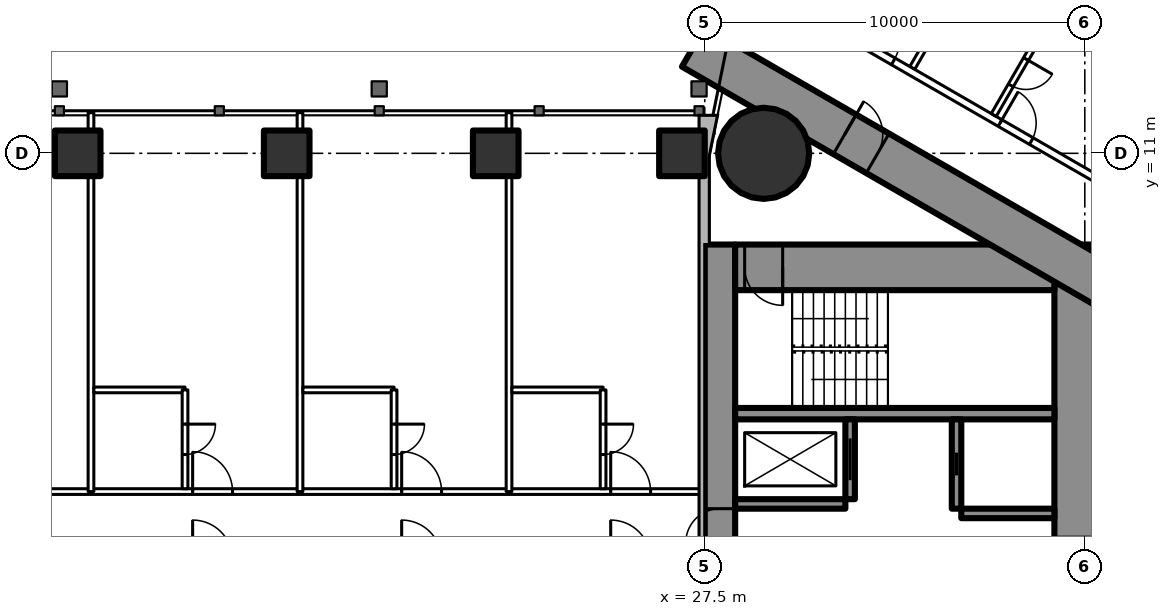
"""IFC4 building model, lengths in metres.
Left out: names, types, materials, properties, quantities, classifications, styles, units other than length and angle.
Written with IfcOpenShell. Run it as: python <this file> out.ifc"""

import sys

from ifc_helpers import new_model, si_unit, direction, frame, frame_2d, origin, origin_2d, place, context, subcontext, project, spatial, rectangle, hollow_rectangle, circle, extrude, element, fill, save


model = new_model("IFC4")
c1 = context("Model", 3, precision=1e-05, world=origin(), true_north=direction((0.0, 1.0)))
c2 = subcontext(c1, "Body", "Model", "MODEL_VIEW")
j1 = project(units=[si_unit("LENGTHUNIT", "METRE"), si_unit("PLANEANGLEUNIT", "RADIAN")], contexts=[c1])
p1 = place(None, origin())
s1 = spatial("IfcSite", under=j1, at=p1, CompositionType="ELEMENT")
p2 = place(p1, origin())
s2 = spatial("IfcBuilding", under=s1, at=p2, CompositionType="ELEMENT")
p3 = place(p2, frame((0.0, 0.0, 215.3)))
s3 = spatial("IfcBuildingStorey", under=s2, at=p3, CompositionType="ELEMENT", Elevation=215.3)
p4 = place(p3, frame((29.05, 11.0, 0.0), z_axis=(0.0, 0.0, 1.0), x_axis=(1.0, 0.0, 0.0)))
e1 = element("IfcColumn", 1, at=p4, inside=s3, PredefinedType="COLUMN", context=c2, shape_type="SweptSolid", body=[
    extrude(circle(Radius=1.2, at=origin_2d()), origin(), (0.0, 0.0, 1.0), 3.6),
])
p5 = place(p3, frame((27.9, -8.6, 0.0), z_axis=(0.0, 0.0, 1.0), x_axis=(0.0, 1.0, 0.0)))
e2 = element("IfcWall", 2, at=p5, inside=s3, PredefinedType="SHEAR", context=c2, shape_type="SweptSolid", body=[
    extrude(rectangle(XDim=17.2, YDim=0.8, at=frame_2d((8.6, 0.0))), origin(), (0.0, 0.0, 1.0), 3.6),
])
p6 = place(p5, frame((9.35, 0.0, 0.0)))
e3 = element("IfcOpeningElement", 3, at=p6, cuts=e2, PredefinedType="OPENING", context=c2, shape_type="SweptSolid", body=[
    extrude(rectangle(XDim=0.9, YDim=2.2, at=frame_2d((0.45, 1.1))), frame((0.0, 0.41, 0.0), z_axis=(0.0, -1.0, 0.0), x_axis=(1.0, 0.0, 0.0)), (0.0, 0.0, 1.0), 0.82),
])
p7 = place(p3, frame((37.3, -8.6, 0.0), z_axis=(0.0, 0.0, 1.0), x_axis=(0.0, 1.0, 0.0)))
e4 = element("IfcWall", 4, at=p7, inside=s3, PredefinedType="SHEAR", context=c2, shape_type="SweptSolid", body=[
    extrude(rectangle(XDim=17.2, YDim=1.2, at=frame_2d((8.6, 0.0))), origin(), (0.0, 0.0, 1.0), 3.6),
])
p8 = place(p7, frame((7.7, 0.0, 0.0)))
e5 = element("IfcOpeningElement", 5, at=p8, cuts=e4, PredefinedType="OPENING", context=c2, shape_type="SweptSolid", body=[
    extrude(rectangle(XDim=1.8, YDim=2.2, at=frame_2d((0.9, 1.1))), frame((0.0, 0.61, 0.0), z_axis=(0.0, -1.0, 0.0), x_axis=(1.0, 0.0, 0.0)), (0.0, 0.0, 1.0), 1.22),
])
p9 = place(p3, frame((28.3, 8.0, 0.0), z_axis=(0.0, 0.0, 1.0), x_axis=(1.0, 0.0, 0.0)))
e6 = element("IfcWall", 6, at=p9, inside=s3, PredefinedType="SHEAR", context=c2, shape_type="SweptSolid", body=[
    extrude(rectangle(XDim=8.4, YDim=1.2, at=frame_2d((4.2, 0.0))), origin(), (0.0, 0.0, 1.0), 3.6),
])
p10 = place(p9, frame((0.25, 0.0, 0.0)))
e7 = element("IfcOpeningElement", 7, at=p10, cuts=e6, PredefinedType="OPENING", context=c2, shape_type="SweptSolid", body=[
    extrude(rectangle(XDim=1.0, YDim=2.2, at=frame_2d((0.5, 1.1))), frame((0.0, 0.61, 0.0), z_axis=(0.0, -1.0, 0.0), x_axis=(1.0, 0.0, 0.0)), (0.0, 0.0, 1.0), 1.22),
])
p11 = place(p3, frame((28.3, 4.15, 0.0), z_axis=(0.0, 0.0, 1.0), x_axis=(1.0, 0.0, 0.0)))
e8 = element("IfcWall", 8, at=p11, inside=s3, PredefinedType="SHEAR", context=c2, shape_type="SweptSolid", body=[
    extrude(rectangle(XDim=8.4, YDim=0.3, at=frame_2d((4.2, 0.0))), origin(), (0.0, 0.0, 1.0), 3.6),
])
p12 = place(p3, frame((31.325, 1.9, 0.0), z_axis=(0.0, 0.0, 1.0), x_axis=(0.0, 1.0, 0.0)))
e9 = element("IfcWall", 9, at=p12, inside=s3, PredefinedType="SHEAR", context=c2, shape_type="SweptSolid", body=[
    extrude(rectangle(XDim=2.1, YDim=0.25, at=frame_2d((1.05, 0.0))), origin(), (0.0, 0.0, 1.0), 3.6),
])
p13 = place(p12, frame((0.5, 0.0, 0.0)))
e10 = element("IfcOpeningElement", 10, at=p13, cuts=e9, PredefinedType="OPENING", context=c2, shape_type="SweptSolid", body=[
    extrude(rectangle(XDim=1.1, YDim=2.2, at=frame_2d((0.55, 1.1))), frame((0.0, 0.135, 0.0), z_axis=(0.0, -1.0, 0.0), x_axis=(1.0, 0.0, 0.0)), (0.0, 0.0, 1.0), 0.27),
])
p14 = place(p3, frame((34.125, 1.65, 0.0), z_axis=(0.0, 0.0, 1.0), x_axis=(0.0, 1.0, 0.0)))
e11 = element("IfcWall", 11, at=p14, inside=s3, PredefinedType="SHEAR", context=c2, shape_type="SweptSolid", body=[
    extrude(rectangle(XDim=2.35, YDim=0.25, at=frame_2d((1.175, 0.0))), origin(), (0.0, 0.0, 1.0), 3.6),
])
p15 = place(p14, frame((0.875, 0.0, 0.0)))
e12 = element("IfcOpeningElement", 12, at=p15, cuts=e11, PredefinedType="OPENING", context=c2, shape_type="SweptSolid", body=[
    extrude(rectangle(XDim=0.6, YDim=2.0, at=frame_2d((0.3, 1.0))), frame((0.0, 0.135, 0.0), z_axis=(0.0, -1.0, 0.0), x_axis=(1.0, 0.0, 0.0)), (0.0, 0.0, 1.0), 0.27),
])
p16 = place(p3, frame((28.3, 1.775, 0.0), z_axis=(0.0, 0.0, 1.0), x_axis=(1.0, 0.0, 0.0)))
e13 = element("IfcWall", 13, at=p16, inside=s3, PredefinedType="SHEAR", context=c2, shape_type="SweptSolid", body=[
    extrude(rectangle(XDim=2.9, YDim=0.25, at=frame_2d((1.45, 0.0))), origin(), (0.0, 0.0, 1.0), 3.6),
])
p17 = place(p3, frame((34.25, 1.525, 0.0), z_axis=(0.0, 0.0, 1.0), x_axis=(1.0, 0.0, 0.0)))
e14 = element("IfcWall", 14, at=p17, inside=s3, PredefinedType="SHEAR", context=c2, shape_type="SweptSolid", body=[
    extrude(rectangle(XDim=2.45, YDim=0.25, at=frame_2d((1.225, 0.0))), origin(), (0.0, 0.0, 1.0), 3.6),
])
p18 = place(p3, frame((27.2, 13.8, 0.0), z_axis=(0.0, 0.0, 1.0), x_axis=(0.866024515034, -0.500001539357, 0.0)))
e15 = element("IfcWall", 15, at=p18, inside=s3, PredefinedType="SHEAR", context=c2, shape_type="SweptSolid", body=[
    extrude(rectangle(XDim=26.907, YDim=1.2, at=frame_2d((13.454, 0.0))), origin(), (0.0, 0.0, 1.0), 3.6),
])
p19 = place(p18, frame((4.6, 0.0, 0.0)))
e16 = element("IfcOpeningElement", 16, at=p19, cuts=e15, PredefinedType="OPENING", context=c2, shape_type="SweptSolid", body=[
    extrude(rectangle(XDim=1.0, YDim=2.2, at=frame_2d((0.5, 1.1))), frame((0.0, 0.61, 0.0), z_axis=(0.0, -1.0, 0.0), x_axis=(1.0, 0.0, 0.0)), (0.0, 0.0, 1.0), 1.22),
])
p20 = place(p18, frame((13.395, 0.0, 0.0)))
e17 = element("IfcOpeningElement", 17, at=p20, cuts=e15, PredefinedType="OPENING", context=c2, shape_type="SweptSolid", body=[
    extrude(rectangle(XDim=1.8, YDim=2.2, at=frame_2d((0.9, 1.1))), frame((0.0, 0.61, 0.0), z_axis=(0.0, -1.0, 0.0), x_axis=(1.0, 0.0, 0.0)), (0.0, 0.0, 1.0), 1.22),
])
for number, where, z_axis, x_axis in (
    (18, (11.0, 11.0, 0.0), (0.0, 0.0, 1.0), (1.0, 0.0, 0.0)),
    (19, (16.5, 11.0, 0.0), (0.0, 0.0, 1.0), (1.0, 0.0, 0.0)),
    (20, (22.0, 11.0, 0.0), (0.0, 0.0, 1.0), (1.0, 0.0, 0.0)),
    (21, (26.9, 11.0, 0.0), (0.0, 0.0, 1.0), (1.0, 0.0, 0.0)),
):
    element("IfcColumn", number, at=place(p3, frame(where, z_axis=z_axis, x_axis=x_axis)), inside=s3, PredefinedType="COLUMN", context=c2, shape_type="SweptSolid", body=[
        extrude(hollow_rectangle(XDim=1.2, YDim=1.2, WallThickness=0.12, at=origin_2d()), origin(), (0.0, 0.0, 1.0), 3.6),
    ])
p21 = place(p3, frame((32.96, 13.246, 0.0), z_axis=(0.0, 0.0, 1.0), x_axis=(0.500000236886, 0.866025267018, 0.0)))
e22 = element("IfcWall", 22, at=p21, inside=s3, PredefinedType="PARTITIONING", context=c2, shape_type="SweptSolid", body=[
    extrude(rectangle(XDim=7.583, YDim=0.15, at=frame_2d((3.791, 0.0))), origin(), (0.0, 0.0, 1.0), 3.35),
])
p22 = place(p3, frame((28.959, 15.44, 0.0), z_axis=(0.0, 0.0, 1.0), x_axis=(0.866028936079, -0.499993881836, 0.0)))
e23 = element("IfcWall", 23, at=p22, inside=s3, PredefinedType="PARTITIONING", context=c2, shape_type="SweptSolid", body=[
    extrude(rectangle(XDim=20.503, YDim=0.2, at=frame_2d((10.251, 0.0))), origin(), (0.0, 0.0, 1.0), 3.35),
])
p23 = place(p22, frame((16.603, 0.0, 0.0)))
e24 = element("IfcOpeningElement", 24, at=p23, cuts=e23, PredefinedType="OPENING", context=c2, shape_type="SweptSolid", body=[
    extrude(rectangle(XDim=0.95, YDim=2.2, at=frame_2d((0.475, 1.1))), frame((0.0, 0.11, 0.0), z_axis=(0.0, -1.0, 0.0), x_axis=(1.0, 0.0, 0.0)), (0.0, 0.0, 1.0), 0.22),
])
p24 = place(p22, frame((7.287, 0.0, 0.0)))
e25 = element("IfcOpeningElement", 25, at=p24, cuts=e23, PredefinedType="OPENING", context=c2, shape_type="SweptSolid", body=[
    extrude(rectangle(XDim=0.95, YDim=2.2, at=frame_2d((0.475, 1.1))), frame((0.0, 0.11, 0.0), z_axis=(0.0, -1.0, 0.0), x_axis=(1.0, 0.0, 0.0)), (0.0, 0.0, 1.0), 0.22),
])
p25 = place(p22, frame((2.244, 0.0, 0.0)))
e26 = element("IfcOpeningElement", 26, at=p25, cuts=e23, PredefinedType="OPENING", context=c2, shape_type="SweptSolid", body=[
    extrude(rectangle(XDim=1.8, YDim=2.2, at=frame_2d((0.9, 1.1))), frame((0.0, 0.11, 0.0), z_axis=(0.0, -1.0, 0.0), x_axis=(1.0, 0.0, 0.0)), (0.0, 0.0, 1.0), 0.22),
])
p26 = place(p3, frame((35.104, 12.008, 0.0), z_axis=(0.0, 0.0, 1.0), x_axis=(0.500047596559, 0.865997922154, 0.0)))
e27 = element("IfcWall", 27, at=p26, inside=s3, PredefinedType="PARTITIONING", context=c2, shape_type="SweptSolid", body=[
    extrude(rectangle(XDim=2.6, YDim=0.15, at=frame_2d((1.3, 0.0))), origin(), (0.0, 0.0, 1.0), 3.35),
])
p27 = place(p26, frame((0.9, 0.0, 0.0)))
e28 = element("IfcOpeningElement", 28, at=p27, cuts=e27, PredefinedType="OPENING", context=c2, shape_type="SweptSolid", body=[
    extrude(rectangle(XDim=0.8, YDim=2.2, at=frame_2d((0.4, 1.1))), frame((0.0, 0.085, 0.0), z_axis=(0.0, -1.0, 0.0), x_axis=(1.0, 0.0, 0.0)), (0.0, 0.0, 1.0), 0.17),
])
p28 = place(p3, frame((-27.5, 2.1, 0.0), z_axis=(0.0, 0.0, 1.0), x_axis=(1.0, 0.0, 0.0)))
e29 = element("IfcWall", 29, at=p28, inside=s3, PredefinedType="PARTITIONING", context=c2, shape_type="SweptSolid", body=[
    extrude(rectangle(XDim=55.0, YDim=0.15, at=frame_2d((27.5, 0.0))), origin(), (0.0, 0.0, 1.0), 3.4),
])
p29 = place(p28, frame((2.025, 0.0, 0.0)))
e30 = element("IfcOpeningElement", 30, at=p29, cuts=e29, PredefinedType="OPENING", context=c2, shape_type="SweptSolid", body=[
    extrude(rectangle(XDim=1.05, YDim=2.4, at=frame_2d((0.525, 1.2))), frame((0.0, 0.085, 0.0), z_axis=(0.0, -1.0, 0.0), x_axis=(1.0, 0.0, 0.0)), (0.0, 0.0, 1.0), 0.17),
])
p30 = place(p28, frame((8.525, 0.0, 0.0)))
e31 = element("IfcOpeningElement", 31, at=p30, cuts=e29, PredefinedType="OPENING", context=c2, shape_type="SweptSolid", body=[
    extrude(rectangle(XDim=1.05, YDim=2.4, at=frame_2d((0.525, 1.2))), frame((0.0, 0.085, 0.0), z_axis=(0.0, -1.0, 0.0), x_axis=(1.0, 0.0, 0.0)), (0.0, 0.0, 1.0), 0.17),
])
p31 = place(p28, frame((14.025, 0.0, 0.0)))
e32 = element("IfcOpeningElement", 32, at=p31, cuts=e29, PredefinedType="OPENING", context=c2, shape_type="SweptSolid", body=[
    extrude(rectangle(XDim=1.05, YDim=2.4, at=frame_2d((0.525, 1.2))), frame((0.0, 0.085, 0.0), z_axis=(0.0, -1.0, 0.0), x_axis=(1.0, 0.0, 0.0)), (0.0, 0.0, 1.0), 0.17),
])
p32 = place(p28, frame((19.525, 0.0, 0.0)))
e33 = element("IfcOpeningElement", 33, at=p32, cuts=e29, PredefinedType="OPENING", context=c2, shape_type="SweptSolid", body=[
    extrude(rectangle(XDim=1.05, YDim=2.4, at=frame_2d((0.525, 1.2))), frame((0.0, 0.085, 0.0), z_axis=(0.0, -1.0, 0.0), x_axis=(1.0, 0.0, 0.0)), (0.0, 0.0, 1.0), 0.17),
])
p33 = place(p28, frame((25.025, 0.0, 0.0)))
e34 = element("IfcOpeningElement", 34, at=p33, cuts=e29, PredefinedType="OPENING", context=c2, shape_type="SweptSolid", body=[
    extrude(rectangle(XDim=1.05, YDim=2.4, at=frame_2d((0.525, 1.2))), frame((0.0, 0.085, 0.0), z_axis=(0.0, -1.0, 0.0), x_axis=(1.0, 0.0, 0.0)), (0.0, 0.0, 1.0), 0.17),
])
p34 = place(p28, frame((30.525, 0.0, 0.0)))
e35 = element("IfcOpeningElement", 35, at=p34, cuts=e29, PredefinedType="OPENING", context=c2, shape_type="SweptSolid", body=[
    extrude(rectangle(XDim=1.05, YDim=2.4, at=frame_2d((0.525, 1.2))), frame((0.0, 0.085, 0.0), z_axis=(0.0, -1.0, 0.0), x_axis=(1.0, 0.0, 0.0)), (0.0, 0.0, 1.0), 0.17),
])
p35 = place(p28, frame((36.025, 0.0, 0.0)))
e36 = element("IfcOpeningElement", 36, at=p35, cuts=e29, PredefinedType="OPENING", context=c2, shape_type="SweptSolid", body=[
    extrude(rectangle(XDim=1.05, YDim=2.4, at=frame_2d((0.525, 1.2))), frame((0.0, 0.085, 0.0), z_axis=(0.0, -1.0, 0.0), x_axis=(1.0, 0.0, 0.0)), (0.0, 0.0, 1.0), 0.17),
])
p36 = place(p28, frame((41.525, 0.0, 0.0)))
e37 = element("IfcOpeningElement", 37, at=p36, cuts=e29, PredefinedType="OPENING", context=c2, shape_type="SweptSolid", body=[
    extrude(rectangle(XDim=1.05, YDim=2.4, at=frame_2d((0.525, 1.2))), frame((0.0, 0.085, 0.0), z_axis=(0.0, -1.0, 0.0), x_axis=(1.0, 0.0, 0.0)), (0.0, 0.0, 1.0), 0.17),
])
p37 = place(p28, frame((47.025, 0.0, 0.0)))
e38 = element("IfcOpeningElement", 38, at=p37, cuts=e29, PredefinedType="OPENING", context=c2, shape_type="SweptSolid", body=[
    extrude(rectangle(XDim=1.05, YDim=2.4, at=frame_2d((0.525, 1.2))), frame((0.0, 0.085, 0.0), z_axis=(0.0, -1.0, 0.0), x_axis=(1.0, 0.0, 0.0)), (0.0, 0.0, 1.0), 0.17),
])
p38 = place(p28, frame((52.525, 0.0, 0.0)))
e39 = element("IfcOpeningElement", 39, at=p38, cuts=e29, PredefinedType="OPENING", context=c2, shape_type="SweptSolid", body=[
    extrude(rectangle(XDim=1.05, YDim=2.4, at=frame_2d((0.525, 1.2))), frame((0.0, 0.085, 0.0), z_axis=(0.0, -1.0, 0.0), x_axis=(1.0, 0.0, 0.0)), (0.0, 0.0, 1.0), 0.17),
])
for number, where, z_axis, x_axis in (
    (40, (11.35, 2.1, 0.0), (0.0, 0.0, 1.0), (0.0, 1.0, 0.0)),
    (41, (16.85, 2.1, 0.0), (0.0, 0.0, 1.0), (0.0, 1.0, 0.0)),
    (42, (22.35, 2.1, 0.0), (0.0, 0.0, 1.0), (0.0, 1.0, 0.0)),
):
    element("IfcWall", number, at=place(p3, frame(where, z_axis=z_axis, x_axis=x_axis)), inside=s3, PredefinedType="PARTITIONING", context=c2, shape_type="SweptSolid", body=[
        extrude(rectangle(XDim=9.97, YDim=0.15, at=frame_2d((4.985, 0.0))), origin(), (0.0, 0.0, 1.0), 3.4),
    ])
p39 = place(p3, frame((11.425, 4.775, 0.0), z_axis=(0.0, 0.0, 1.0), x_axis=(1.0, 0.0, 0.0)))
e43 = element("IfcWall", 43, at=p39, inside=s3, PredefinedType="PARTITIONING", context=c2, shape_type="SweptSolid", body=[
    extrude(rectangle(XDim=2.4, YDim=0.15, at=frame_2d((1.2, 0.0))), origin(), (0.0, 0.0, 1.0), 3.4),
])
p40 = place(p3, frame((13.825, 2.175, 0.0), z_axis=(0.0, 0.0, 1.0), x_axis=(0.0, 1.0, 0.0)))
e44 = element("IfcWall", 44, at=p40, inside=s3, PredefinedType="PARTITIONING", context=c2, shape_type="SweptSolid", body=[
    extrude(rectangle(XDim=2.6, YDim=0.15, at=frame_2d((1.3, 0.0))), origin(), (0.0, 0.0, 1.0), 3.4),
])
p41 = place(p40, frame((0.9, 0.0, 0.0)))
e45 = element("IfcOpeningElement", 45, at=p41, cuts=e44, PredefinedType="OPENING", context=c2, shape_type="SweptSolid", body=[
    extrude(rectangle(XDim=0.8, YDim=2.2, at=frame_2d((0.4, 1.1))), frame((0.0, 0.085, 0.0), z_axis=(0.0, -1.0, 0.0), x_axis=(1.0, 0.0, 0.0)), (0.0, 0.0, 1.0), 0.17),
])
p42 = place(p3, frame((16.925, 4.775, 0.0), z_axis=(0.0, 0.0, 1.0), x_axis=(1.0, 0.0, 0.0)))
e46 = element("IfcWall", 46, at=p42, inside=s3, PredefinedType="PARTITIONING", context=c2, shape_type="SweptSolid", body=[
    extrude(rectangle(XDim=2.4, YDim=0.15, at=frame_2d((1.2, 0.0))), origin(), (0.0, 0.0, 1.0), 3.4),
])
p43 = place(p3, frame((19.325, 2.175, 0.0), z_axis=(0.0, 0.0, 1.0), x_axis=(0.0, 1.0, 0.0)))
e47 = element("IfcWall", 47, at=p43, inside=s3, PredefinedType="PARTITIONING", context=c2, shape_type="SweptSolid", body=[
    extrude(rectangle(XDim=2.6, YDim=0.15, at=frame_2d((1.3, 0.0))), origin(), (0.0, 0.0, 1.0), 3.4),
])
p44 = place(p43, frame((0.9, 0.0, 0.0)))
e48 = element("IfcOpeningElement", 48, at=p44, cuts=e47, PredefinedType="OPENING", context=c2, shape_type="SweptSolid", body=[
    extrude(rectangle(XDim=0.8, YDim=2.2, at=frame_2d((0.4, 1.1))), frame((0.0, 0.085, 0.0), z_axis=(0.0, -1.0, 0.0), x_axis=(1.0, 0.0, 0.0)), (0.0, 0.0, 1.0), 0.17),
])
p45 = place(p3, frame((22.425, 4.775, 0.0), z_axis=(0.0, 0.0, 1.0), x_axis=(1.0, 0.0, 0.0)))
e49 = element("IfcWall", 49, at=p45, inside=s3, PredefinedType="PARTITIONING", context=c2, shape_type="SweptSolid", body=[
    extrude(rectangle(XDim=2.4, YDim=0.15, at=frame_2d((1.2, 0.0))), origin(), (0.0, 0.0, 1.0), 3.4),
])
p46 = place(p3, frame((24.825, 2.175, 0.0), z_axis=(0.0, 0.0, 1.0), x_axis=(0.0, 1.0, 0.0)))
e50 = element("IfcWall", 50, at=p46, inside=s3, PredefinedType="PARTITIONING", context=c2, shape_type="SweptSolid", body=[
    extrude(rectangle(XDim=2.6, YDim=0.15, at=frame_2d((1.3, 0.0))), origin(), (0.0, 0.0, 1.0), 3.4),
])
p47 = place(p46, frame((0.9, 0.0, 0.0)))
e51 = element("IfcOpeningElement", 51, at=p47, cuts=e50, PredefinedType="OPENING", context=c2, shape_type="SweptSolid", body=[
    extrude(rectangle(XDim=0.8, YDim=2.2, at=frame_2d((0.4, 1.1))), frame((0.0, 0.085, 0.0), z_axis=(0.0, -1.0, 0.0), x_axis=(1.0, 0.0, 0.0)), (0.0, 0.0, 1.0), 0.17),
])
p48 = place(p27, origin())
e52 = element("IfcDoor", 52, at=p48, inside=s3, OperationType="SINGLE_SWING_RIGHT", PredefinedType="DOOR", context=c2, shape_type="SweptSolid", body=[
    extrude(rectangle(XDim=0.8, YDim=2.2, at=frame_2d((0.4, 1.1))), frame((0.0, 0.025, 0.0), z_axis=(0.0, -1.0, 0.0), x_axis=(1.0, 0.0, 0.0)), (0.0, 0.0, 1.0), 0.05),
])
fill(e28, e52)
p49 = place(p24, origin())
e53 = element("IfcDoor", 53, at=p49, inside=s3, OperationType="SINGLE_SWING_LEFT", PredefinedType="DOOR", context=c2, shape_type="SweptSolid", body=[
    extrude(rectangle(XDim=0.95, YDim=2.2, at=frame_2d((0.475, 1.1))), frame((0.0, 0.025, 0.0), z_axis=(0.0, -1.0, 0.0), x_axis=(1.0, 0.0, 0.0)), (0.0, 0.0, 1.0), 0.05),
])
fill(e25, e53)
p50 = place(p25, origin())
e54 = element("IfcDoor", 54, at=p50, inside=s3, OperationType="DOUBLE_DOOR_SINGLE_SWING", PredefinedType="DOOR", context=c2, shape_type="SweptSolid", body=[
    extrude(rectangle(XDim=1.8, YDim=2.2, at=frame_2d((0.9, 1.1))), frame((0.0, 0.025, 0.0), z_axis=(0.0, -1.0, 0.0), x_axis=(1.0, 0.0, 0.0)), (0.0, 0.0, 1.0), 0.05),
])
fill(e26, e54)
p51 = place(p19, origin())
e55 = element("IfcDoor", 55, at=p51, inside=s3, OperationType="SINGLE_SWING_LEFT", PredefinedType="DOOR", context=c2, shape_type="SweptSolid", body=[
    extrude(rectangle(XDim=1.0, YDim=2.2, at=frame_2d((0.5, 1.1))), frame((0.0, 0.025, 0.0), z_axis=(0.0, -1.0, 0.0), x_axis=(1.0, 0.0, 0.0)), (0.0, 0.0, 1.0), 0.05),
])
fill(e16, e55)
p52 = place(p10, origin())
e56 = element("IfcDoor", 56, at=p52, inside=s3, OperationType="SINGLE_SWING_RIGHT", PredefinedType="DOOR", context=c2, shape_type="SweptSolid", body=[
    extrude(rectangle(XDim=1.0, YDim=2.2, at=frame_2d((0.5, 1.1))), frame((0.0, 0.025, 0.0), z_axis=(0.0, -1.0, 0.0), x_axis=(1.0, 0.0, 0.0)), (0.0, 0.0, 1.0), 0.05),
])
fill(e7, e56)
p53 = place(p6, origin())
e57 = element("IfcDoor", 57, at=p53, inside=s3, OperationType="SINGLE_SWING_LEFT", PredefinedType="DOOR", context=c2, shape_type="SweptSolid", body=[
    extrude(rectangle(XDim=0.9, YDim=2.2, at=frame_2d((0.45, 1.1))), frame((0.0, 0.025, 0.0), z_axis=(0.0, -1.0, 0.0), x_axis=(1.0, 0.0, 0.0)), (0.0, 0.0, 1.0), 0.05),
])
fill(e3, e57)
p54 = place(p41, origin())
e58 = element("IfcDoor", 58, at=p54, inside=s3, OperationType="SINGLE_SWING_RIGHT", PredefinedType="DOOR", context=c2, shape_type="SweptSolid", body=[
    extrude(rectangle(XDim=0.8, YDim=2.2, at=frame_2d((0.4, 1.1))), frame((0.0, 0.025, 0.0), z_axis=(0.0, -1.0, 0.0), x_axis=(1.0, 0.0, 0.0)), (0.0, 0.0, 1.0), 0.05),
])
fill(e45, e58)
p55 = place(p36, origin())
e59 = element("IfcDoor", 59, at=p55, inside=s3, OperationType="SINGLE_SWING_LEFT", PredefinedType="DOOR", context=c2, shape_type="SweptSolid", body=[
    extrude(rectangle(XDim=1.05, YDim=2.4, at=frame_2d((0.525, 1.2))), frame((0.0, 0.025, 0.0), z_axis=(0.0, -1.0, 0.0), x_axis=(1.0, 0.0, 0.0)), (0.0, 0.0, 1.0), 0.05),
])
fill(e37, e59)
p56 = place(p44, origin())
e60 = element("IfcDoor", 60, at=p56, inside=s3, OperationType="SINGLE_SWING_RIGHT", PredefinedType="DOOR", context=c2, shape_type="SweptSolid", body=[
    extrude(rectangle(XDim=0.8, YDim=2.2, at=frame_2d((0.4, 1.1))), frame((0.0, 0.025, 0.0), z_axis=(0.0, -1.0, 0.0), x_axis=(1.0, 0.0, 0.0)), (0.0, 0.0, 1.0), 0.05),
])
fill(e48, e60)
p57 = place(p37, origin())
e61 = element("IfcDoor", 61, at=p57, inside=s3, OperationType="SINGLE_SWING_LEFT", PredefinedType="DOOR", context=c2, shape_type="SweptSolid", body=[
    extrude(rectangle(XDim=1.05, YDim=2.4, at=frame_2d((0.525, 1.2))), frame((0.0, 0.025, 0.0), z_axis=(0.0, -1.0, 0.0), x_axis=(1.0, 0.0, 0.0)), (0.0, 0.0, 1.0), 0.05),
])
fill(e38, e61)
p58 = place(p47, origin())
e62 = element("IfcDoor", 62, at=p58, inside=s3, OperationType="SINGLE_SWING_RIGHT", PredefinedType="DOOR", context=c2, shape_type="SweptSolid", body=[
    extrude(rectangle(XDim=0.8, YDim=2.2, at=frame_2d((0.4, 1.1))), frame((0.0, 0.025, 0.0), z_axis=(0.0, -1.0, 0.0), x_axis=(1.0, 0.0, 0.0)), (0.0, 0.0, 1.0), 0.05),
])
fill(e51, e62)
p59 = place(p38, origin())
e63 = element("IfcDoor", 63, at=p59, inside=s3, OperationType="SINGLE_SWING_LEFT", PredefinedType="DOOR", context=c2, shape_type="SweptSolid", body=[
    extrude(rectangle(XDim=1.05, YDim=2.4, at=frame_2d((0.525, 1.2))), frame((0.0, 0.025, 0.0), z_axis=(0.0, -1.0, 0.0), x_axis=(1.0, 0.0, 0.0)), (0.0, 0.0, 1.0), 0.05),
])
fill(e39, e63)
p60 = place(p13, origin())
e64 = element("IfcDoor", 64, at=p60, inside=s3, OperationType="SLIDING_TO_LEFT", PredefinedType="USERDEFINED", context=c2, shape_type="SweptSolid", body=[
    extrude(rectangle(XDim=1.1, YDim=2.2, at=frame_2d((0.55, 1.1))), frame((0.0, 0.025, 0.0), z_axis=(0.0, -1.0, 0.0), x_axis=(1.0, 0.0, 0.0)), (0.0, 0.0, 1.0), 0.05),
])
fill(e10, e64)
p61 = place(p15, origin())
e65 = element("IfcDoor", 65, at=p61, inside=s3, OperationType="SLIDING_TO_LEFT", PredefinedType="DOOR", context=c2, shape_type="SweptSolid", body=[
    extrude(rectangle(XDim=0.6, YDim=2.0, at=frame_2d((0.3, 1.0))), frame((0.0, 0.025, 0.0), z_axis=(0.0, -1.0, 0.0), x_axis=(1.0, 0.0, 0.0)), (0.0, 0.0, 1.0), 0.05),
])
fill(e12, e65)
save(model, sys.argv[1])
